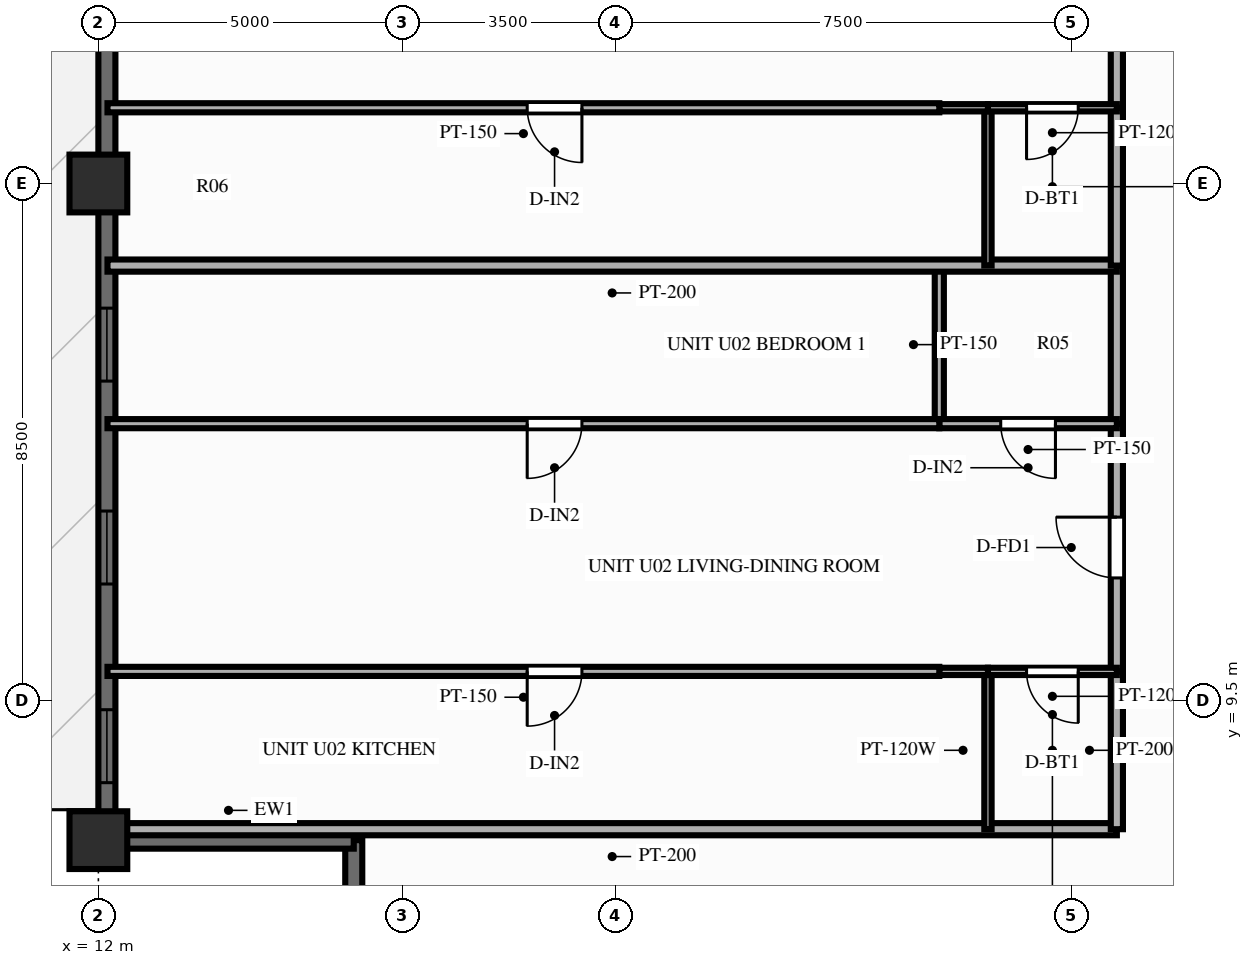
"""IFC4 building model, lengths in metres.
Left out: names, types, materials, properties, quantities, classifications, styles, units other than length and angle.
Written with IfcOpenShell. Run it as: python <this file> out.ifc"""

import sys

from ifc_helpers import new_model, si_unit, direction, frame, frame_2d, origin, origin_2d, place, context, subcontext, project, spatial, rectangle, extrude, source, transform, mapped, element, fill, save


model = new_model("IFC4")
c1 = context("Model", 3, precision=1e-05, world=origin(), true_north=direction((0.0, 1.0)))
c2 = subcontext(c1, "Body", "Model", "MODEL_VIEW")
j1 = project(units=[si_unit("LENGTHUNIT", "METRE"), si_unit("PLANEANGLEUNIT", "RADIAN")], contexts=[c1])
p1 = place(None, origin())
s1 = spatial("IfcSite", under=j1, at=p1, CompositionType="ELEMENT")
p2 = place(p1, origin())
s2 = spatial("IfcBuilding", under=s1, at=p2, CompositionType="ELEMENT")
p3 = place(p2, frame((0.0, 0.0, 141.75)))
s3 = spatial("IfcBuildingStorey", under=s2, at=p3, CompositionType="ELEMENT", Elevation=141.75)
m1 = source(origin(), c2, "Body", "SweptSolid", [
    extrude(rectangle(XDim=0.95, YDim=0.95, at=origin_2d()), origin(), (0.0, 0.0, 1.0), 3.0),
])
for number, where, z_axis, x_axis in (
    (1, (12.0, 18.0, 0.0), (0.0, 0.0, 1.0), (1.0, 0.0, 0.0)),
    (2, (12.0, 7.2, 0.0), (0.0, 0.0, 1.0), (1.0, 0.0, 0.0)),
):
    element("IfcColumn", number, at=place(p3, frame(where, z_axis=z_axis, x_axis=x_axis)), inside=s3, PredefinedType="COLUMN", context=c2, shape_type="MappedRepresentation", body=[
        mapped(m1, transform((0.0, 0.0, 0.0), scale=1.0)),
    ])
p4 = place(p3, frame((12.14, 7.2, 0.0), z_axis=(0.0, 0.0, 1.0), x_axis=(0.0, 1.0, 0.0)))
e3 = element("IfcWall", 3, at=p4, inside=s3, PredefinedType="SOLIDWALL", context=c2, shape_type="SweptSolid", body=[
    extrude(rectangle(XDim=39.6, YDim=0.28, at=frame_2d((19.8, 0.0))), origin(), (0.0, 0.0, 1.0), 2.28),
])
p5 = place(p4, frame((0.945, 0.0, 0.25)))
e4 = element("IfcOpeningElement", 4, at=p5, cuts=e3, PredefinedType="OPENING", context=c2, shape_type="SweptSolid", body=[
    extrude(rectangle(XDim=1.2, YDim=1.5, at=frame_2d((0.6, 0.75))), frame((0.0, 0.152, 0.0), z_axis=(0.0, -1.0, 0.0), x_axis=(1.0, 0.0, 0.0)), (0.0, 0.0, 1.0), 0.304),
])
p6 = place(p4, frame((4.213, 0.0, 0.25)))
e5 = element("IfcOpeningElement", 5, at=p6, cuts=e3, PredefinedType="OPENING", context=c2, shape_type="SweptSolid", body=[
    extrude(rectangle(XDim=1.2, YDim=1.5, at=frame_2d((0.6, 0.75))), frame((0.0, 0.152, 0.0), z_axis=(0.0, -1.0, 0.0), x_axis=(1.0, 0.0, 0.0)), (0.0, 0.0, 1.0), 0.304),
])
p7 = place(p4, frame((7.55, 0.0, 0.25)))
e6 = element("IfcOpeningElement", 6, at=p7, cuts=e3, PredefinedType="OPENING", context=c2, shape_type="SweptSolid", body=[
    extrude(rectangle(XDim=1.2, YDim=1.5, at=frame_2d((0.6, 0.75))), frame((0.0, 0.152, 0.0), z_axis=(0.0, -1.0, 0.0), x_axis=(1.0, 0.0, 0.0)), (0.0, 0.0, 1.0), 0.304),
])
p8 = place(p4, frame((13.483, 0.0, 0.25)))
e7 = element("IfcOpeningElement", 7, at=p8, cuts=e3, PredefinedType="OPENING", context=c2, shape_type="SweptSolid", body=[
    extrude(rectangle(XDim=1.2, YDim=1.5, at=frame_2d((0.6, 0.75))), frame((0.0, 0.152, 0.0), z_axis=(0.0, -1.0, 0.0), x_axis=(1.0, 0.0, 0.0)), (0.0, 0.0, 1.0), 0.304),
])
p9 = place(p4, frame((16.82, 0.0, 0.25)))
e8 = element("IfcOpeningElement", 8, at=p9, cuts=e3, PredefinedType="OPENING", context=c2, shape_type="SweptSolid", body=[
    extrude(rectangle(XDim=1.2, YDim=1.5, at=frame_2d((0.6, 0.75))), frame((0.0, 0.152, 0.0), z_axis=(0.0, -1.0, 0.0), x_axis=(1.0, 0.0, 0.0)), (0.0, 0.0, 1.0), 0.304),
])
p10 = place(p4, frame((19.2, 0.0, 0.25)))
e9 = element("IfcOpeningElement", 9, at=p10, cuts=e3, PredefinedType="OPENING", context=c2, shape_type="SweptSolid", body=[
    extrude(rectangle(XDim=1.2, YDim=1.5, at=frame_2d((0.6, 0.75))), frame((0.0, 0.152, 0.0), z_axis=(0.0, -1.0, 0.0), x_axis=(1.0, 0.0, 0.0)), (0.0, 0.0, 1.0), 0.304),
])
p11 = place(p4, frame((21.578, 0.0, 0.25)))
e10 = element("IfcOpeningElement", 10, at=p11, cuts=e3, PredefinedType="OPENING", context=c2, shape_type="SweptSolid", body=[
    extrude(rectangle(XDim=1.2, YDim=1.5, at=frame_2d((0.6, 0.75))), frame((0.0, 0.152, 0.0), z_axis=(0.0, -1.0, 0.0), x_axis=(1.0, 0.0, 0.0)), (0.0, 0.0, 1.0), 0.304),
])
p12 = place(p4, frame((24.713, 0.0, 0.0)))
e11 = element("IfcOpeningElement", 11, at=p12, cuts=e3, PredefinedType="OPENING", context=c2, shape_type="SweptSolid", body=[
    extrude(rectangle(XDim=1.6, YDim=2.15, at=frame_2d((0.8, 1.075))), frame((0.0, 0.152, 0.0), z_axis=(0.0, -1.0, 0.0), x_axis=(1.0, 0.0, 0.0)), (0.0, 0.0, 1.0), 0.304),
])
p13 = place(p4, frame((29.305, 0.0, 0.25)))
e12 = element("IfcOpeningElement", 12, at=p13, cuts=e3, PredefinedType="OPENING", context=c2, shape_type="SweptSolid", body=[
    extrude(rectangle(XDim=0.7, YDim=1.5, at=frame_2d((0.35, 0.75))), frame((0.0, 0.152, 0.0), z_axis=(0.0, -1.0, 0.0), x_axis=(1.0, 0.0, 0.0)), (0.0, 0.0, 1.0), 0.304),
])
p14 = place(p4, frame((30.848, 0.0, 0.25)))
e13 = element("IfcOpeningElement", 13, at=p14, cuts=e3, PredefinedType="OPENING", context=c2, shape_type="SweptSolid", body=[
    extrude(rectangle(XDim=1.2, YDim=1.5, at=frame_2d((0.6, 0.75))), frame((0.0, 0.152, 0.0), z_axis=(0.0, -1.0, 0.0), x_axis=(1.0, 0.0, 0.0)), (0.0, 0.0, 1.0), 0.304),
])
p15 = place(p4, frame((34.183, 0.0, 0.25)))
e14 = element("IfcOpeningElement", 14, at=p15, cuts=e3, PredefinedType="OPENING", context=c2, shape_type="SweptSolid", body=[
    extrude(rectangle(XDim=1.2, YDim=1.5, at=frame_2d((0.6, 0.75))), frame((0.0, 0.152, 0.0), z_axis=(0.0, -1.0, 0.0), x_axis=(1.0, 0.0, 0.0)), (0.0, 0.0, 1.0), 0.304),
])
p16 = place(p4, frame((37.452, 0.0, 0.25)))
e15 = element("IfcOpeningElement", 15, at=p16, cuts=e3, PredefinedType="OPENING", context=c2, shape_type="SweptSolid", body=[
    extrude(rectangle(XDim=1.2, YDim=1.5, at=frame_2d((0.6, 0.75))), frame((0.0, 0.152, 0.0), z_axis=(0.0, -1.0, 0.0), x_axis=(1.0, 0.0, 0.0)), (0.0, 0.0, 1.0), 0.304),
])
for number, where, z_axis, x_axis in (
    (16, (16.2, 3.08, 0.0), (0.0, 0.0, 1.0), (0.0, 1.0, 0.0)),
    (17, (12.08, 7.2, 0.0), (0.0, 0.0, 1.0), (1.0, 0.0, 0.0)),
):
    element("IfcWall", number, at=place(p3, frame(where, z_axis=z_axis, x_axis=x_axis)), inside=s3, PredefinedType="SOLIDWALL", context=c2, shape_type="SweptSolid", body=[
        extrude(rectangle(XDim=4.12, YDim=0.28, at=frame_2d((2.06, 0.0))), origin(), (0.0, 0.0, 1.0), 2.28),
    ])
p17 = place(p3, frame((28.75, 7.38, 0.0), z_axis=(0.0, 0.0, 1.0), x_axis=(-1.0, 0.0, 0.0)))
e18 = element("IfcWall", 18, at=p17, inside=s3, PredefinedType="PARTITIONING", context=c2, shape_type="SweptSolid", body=[
    extrude(rectangle(XDim=16.6, YDim=0.2, at=frame_2d((8.3, 0.0))), origin(), (0.0, 0.0, 1.0), 2.7),
])
p18 = place(p3, frame((28.75, 7.38, 0.0), z_axis=(0.0, 0.0, 1.0), x_axis=(0.0, 1.0, 0.0)))
e19 = element("IfcWall", 19, at=p18, inside=s3, PredefinedType="PARTITIONING", context=c2, shape_type="SweptSolid", body=[
    extrude(rectangle(XDim=2.596, YDim=0.2, at=frame_2d((1.298, 0.0))), origin(), (0.0, 0.0, 1.0), 2.7),
])
p19 = place(p3, frame((28.75, 9.976, 0.0), z_axis=(0.0, 0.0, 1.0), x_axis=(0.0, 1.0, 0.0)))
e20 = element("IfcWall", 20, at=p19, inside=s3, PredefinedType="PARTITIONING", context=c2, shape_type="SweptSolid", body=[
    extrude(rectangle(XDim=4.074, YDim=0.2, at=frame_2d((2.037, 0.0))), origin(), (0.0, 0.0, 1.0), 2.7),
])
p20 = place(p19, frame((1.537, 0.0, 0.0)))
e21 = element("IfcOpeningElement", 21, at=p20, cuts=e20, PredefinedType="OPENING", context=c2, shape_type="SweptSolid", body=[
    extrude(rectangle(XDim=1.0, YDim=2.15, at=frame_2d((0.5, 1.075))), frame((0.0, 0.112, 0.0), z_axis=(0.0, -1.0, 0.0), x_axis=(1.0, 0.0, 0.0)), (0.0, 0.0, 1.0), 0.224),
])
p21 = place(p3, frame((28.75, 14.05, 0.0), z_axis=(0.0, 0.0, 1.0), x_axis=(0.0, 1.0, 0.0)))
e22 = element("IfcWall", 22, at=p21, inside=s3, PredefinedType="PARTITIONING", context=c2, shape_type="SweptSolid", body=[
    extrude(rectangle(XDim=2.6, YDim=0.2, at=frame_2d((1.3, 0.0))), origin(), (0.0, 0.0, 1.0), 2.7),
])
p22 = place(p3, frame((26.63, 7.38, 0.0), z_axis=(0.0, 0.0, 1.0), x_axis=(0.0, 1.0, 0.0)))
e23 = element("IfcWall", 23, at=p22, inside=s3, PredefinedType="PARTITIONING", context=c2, shape_type="SweptSolid", body=[
    extrude(rectangle(XDim=2.596, YDim=0.12, at=frame_2d((1.298, 0.0))), origin(), (0.0, 0.0, 1.0), 2.7),
])
p23 = place(p3, frame((25.83, 14.05, 0.0), z_axis=(0.0, 0.0, 1.0), x_axis=(0.0, 1.0, 0.0)))
e24 = element("IfcWall", 24, at=p23, inside=s3, PredefinedType="PARTITIONING", context=c2, shape_type="SweptSolid", body=[
    extrude(rectangle(XDim=2.6, YDim=0.15, at=frame_2d((1.3, 0.0))), origin(), (0.0, 0.0, 1.0), 2.7),
])
p24 = place(p3, frame((28.75, 9.976, 0.0), z_axis=(0.0, 0.0, 1.0), x_axis=(-1.0, 0.0, 0.0)))
e25 = element("IfcWall", 25, at=p24, inside=s3, PredefinedType="PARTITIONING", context=c2, shape_type="SweptSolid", body=[
    extrude(rectangle(XDim=2.12, YDim=0.12, at=frame_2d((1.06, 0.0))), origin(), (0.0, 0.0, 1.0), 2.7),
])
p25 = place(p24, frame((0.635, 0.0, 0.0)))
e26 = element("IfcOpeningElement", 26, at=p25, cuts=e25, PredefinedType="OPENING", context=c2, shape_type="SweptSolid", body=[
    extrude(rectangle(XDim=0.85, YDim=2.05, at=frame_2d((0.425, 1.025))), frame((0.0, 0.072, 0.0), z_axis=(0.0, -1.0, 0.0), x_axis=(1.0, 0.0, 0.0)), (0.0, 0.0, 1.0), 0.144),
])
p26 = place(p3, frame((26.63, 9.976, 0.0), z_axis=(0.0, 0.0, 1.0), x_axis=(-1.0, 0.0, 0.0)))
e27 = element("IfcWall", 27, at=p26, inside=s3, PredefinedType="PARTITIONING", context=c2, shape_type="SweptSolid", body=[
    extrude(rectangle(XDim=0.8, YDim=0.12, at=frame_2d((0.4, 0.0))), origin(), (0.0, 0.0, 1.0), 2.7),
])
p27 = place(p3, frame((25.83, 9.976, 0.0), z_axis=(0.0, 0.0, 1.0), x_axis=(-1.0, 0.0, 0.0)))
e28 = element("IfcWall", 28, at=p27, inside=s3, PredefinedType="PARTITIONING", context=c2, shape_type="SweptSolid", body=[
    extrude(rectangle(XDim=13.68, YDim=0.15, at=frame_2d((6.84, 0.0))), origin(), (0.0, 0.0, 1.0), 2.7),
])
p28 = place(p27, frame((5.877, 0.0, 0.0)))
e29 = element("IfcOpeningElement", 29, at=p28, cuts=e28, PredefinedType="OPENING", context=c2, shape_type="SweptSolid", body=[
    extrude(rectangle(XDim=0.9, YDim=2.1, at=frame_2d((0.45, 1.05))), frame((0.0, 0.087, 0.0), z_axis=(0.0, -1.0, 0.0), x_axis=(1.0, 0.0, 0.0)), (0.0, 0.0, 1.0), 0.174),
])
p29 = place(p3, frame((28.75, 14.05, 0.0), z_axis=(0.0, 0.0, 1.0), x_axis=(-1.0, 0.0, 0.0)))
e30 = element("IfcWall", 30, at=p29, inside=s3, PredefinedType="PARTITIONING", context=c2, shape_type="SweptSolid", body=[
    extrude(rectangle(XDim=2.92, YDim=0.15, at=frame_2d((1.46, 0.0))), origin(), (0.0, 0.0, 1.0), 2.7),
])
p30 = place(p29, frame((1.01, 0.0, 0.0)))
e31 = element("IfcOpeningElement", 31, at=p30, cuts=e30, PredefinedType="OPENING", context=c2, shape_type="SweptSolid", body=[
    extrude(rectangle(XDim=0.9, YDim=2.1, at=frame_2d((0.45, 1.05))), frame((0.0, 0.087, 0.0), z_axis=(0.0, -1.0, 0.0), x_axis=(1.0, 0.0, 0.0)), (0.0, 0.0, 1.0), 0.174),
])
p31 = place(p3, frame((25.83, 14.05, 0.0), z_axis=(0.0, 0.0, 1.0), x_axis=(-1.0, 0.0, 0.0)))
e32 = element("IfcWall", 32, at=p31, inside=s3, PredefinedType="PARTITIONING", context=c2, shape_type="SweptSolid", body=[
    extrude(rectangle(XDim=13.68, YDim=0.15, at=frame_2d((6.84, 0.0))), origin(), (0.0, 0.0, 1.0), 2.7),
])
p32 = place(p31, frame((5.877, 0.0, 0.0)))
e33 = element("IfcOpeningElement", 33, at=p32, cuts=e32, PredefinedType="OPENING", context=c2, shape_type="SweptSolid", body=[
    extrude(rectangle(XDim=0.9, YDim=2.1, at=frame_2d((0.45, 1.05))), frame((0.0, 0.087, 0.0), z_axis=(0.0, -1.0, 0.0), x_axis=(1.0, 0.0, 0.0)), (0.0, 0.0, 1.0), 0.174),
])
p33 = place(p3, frame((28.75, 16.65, 0.0), z_axis=(0.0, 0.0, 1.0), x_axis=(-1.0, 0.0, 0.0)))
e34 = element("IfcWall", 34, at=p33, inside=s3, PredefinedType="PARTITIONING", context=c2, shape_type="SweptSolid", body=[
    extrude(rectangle(XDim=16.6, YDim=0.2, at=frame_2d((8.3, 0.0))), origin(), (0.0, 0.0, 1.0), 2.7),
])
p34 = place(p3, frame((28.75, 16.65, 0.0), z_axis=(0.0, 0.0, 1.0), x_axis=(0.0, 1.0, 0.0)))
e35 = element("IfcWall", 35, at=p34, inside=s3, PredefinedType="PARTITIONING", context=c2, shape_type="SweptSolid", body=[
    extrude(rectangle(XDim=2.596, YDim=0.2, at=frame_2d((1.298, 0.0))), origin(), (0.0, 0.0, 1.0), 2.7),
])
p35 = place(p3, frame((28.75, 19.246, 0.0), z_axis=(0.0, 0.0, 1.0), x_axis=(0.0, 1.0, 0.0)))
e36 = element("IfcWall", 36, at=p35, inside=s3, PredefinedType="PARTITIONING", context=c2, shape_type="SweptSolid", body=[
    extrude(rectangle(XDim=4.074, YDim=0.2, at=frame_2d((2.037, 0.0))), origin(), (0.0, 0.0, 1.0), 2.7),
])
p36 = place(p35, frame((1.537, 0.0, 0.0)))
e37 = element("IfcOpeningElement", 37, at=p36, cuts=e36, PredefinedType="OPENING", context=c2, shape_type="SweptSolid", body=[
    extrude(rectangle(XDim=1.0, YDim=2.15, at=frame_2d((0.5, 1.075))), frame((0.0, 0.112, 0.0), z_axis=(0.0, -1.0, 0.0), x_axis=(1.0, 0.0, 0.0)), (0.0, 0.0, 1.0), 0.224),
])
p37 = place(p3, frame((26.63, 16.65, 0.0), z_axis=(0.0, 0.0, 1.0), x_axis=(0.0, 1.0, 0.0)))
e38 = element("IfcWall", 38, at=p37, inside=s3, PredefinedType="PARTITIONING", context=c2, shape_type="SweptSolid", body=[
    extrude(rectangle(XDim=2.596, YDim=0.12, at=frame_2d((1.298, 0.0))), origin(), (0.0, 0.0, 1.0), 2.7),
])
p38 = place(p3, frame((28.75, 19.246, 0.0), z_axis=(0.0, 0.0, 1.0), x_axis=(-1.0, 0.0, 0.0)))
e39 = element("IfcWall", 39, at=p38, inside=s3, PredefinedType="PARTITIONING", context=c2, shape_type="SweptSolid", body=[
    extrude(rectangle(XDim=2.12, YDim=0.12, at=frame_2d((1.06, 0.0))), origin(), (0.0, 0.0, 1.0), 2.7),
])
p39 = place(p38, frame((0.635, 0.0, 0.0)))
e40 = element("IfcOpeningElement", 40, at=p39, cuts=e39, PredefinedType="OPENING", context=c2, shape_type="SweptSolid", body=[
    extrude(rectangle(XDim=0.85, YDim=2.05, at=frame_2d((0.425, 1.025))), frame((0.0, 0.072, 0.0), z_axis=(0.0, -1.0, 0.0), x_axis=(1.0, 0.0, 0.0)), (0.0, 0.0, 1.0), 0.144),
])
p40 = place(p3, frame((26.63, 19.246, 0.0), z_axis=(0.0, 0.0, 1.0), x_axis=(-1.0, 0.0, 0.0)))
e41 = element("IfcWall", 41, at=p40, inside=s3, PredefinedType="PARTITIONING", context=c2, shape_type="SweptSolid", body=[
    extrude(rectangle(XDim=0.8, YDim=0.12, at=frame_2d((0.4, 0.0))), origin(), (0.0, 0.0, 1.0), 2.7),
])
p41 = place(p3, frame((25.83, 19.246, 0.0), z_axis=(0.0, 0.0, 1.0), x_axis=(-1.0, 0.0, 0.0)))
e42 = element("IfcWall", 42, at=p41, inside=s3, PredefinedType="PARTITIONING", context=c2, shape_type="SweptSolid", body=[
    extrude(rectangle(XDim=13.68, YDim=0.15, at=frame_2d((6.84, 0.0))), origin(), (0.0, 0.0, 1.0), 2.7),
])
p42 = place(p41, frame((5.877, 0.0, 0.0)))
e43 = element("IfcOpeningElement", 43, at=p42, cuts=e42, PredefinedType="OPENING", context=c2, shape_type="SweptSolid", body=[
    extrude(rectangle(XDim=0.9, YDim=2.1, at=frame_2d((0.45, 1.05))), frame((0.0, 0.087, 0.0), z_axis=(0.0, -1.0, 0.0), x_axis=(1.0, 0.0, 0.0)), (0.0, 0.0, 1.0), 0.174),
])
m2 = source(origin(), c2, "Body", "SweptSolid", [
    extrude(rectangle(XDim=1.2, YDim=1.5, at=frame_2d((0.6, 0.75))), frame((0.0, 0.03, 0.0), z_axis=(0.0, -1.0, 0.0), x_axis=(1.0, 0.0, 0.0)), (0.0, 0.0, 1.0), 0.06),
])
p43 = place(p5, origin())
e44 = element("IfcWindow", 44, at=p43, inside=s3, PartitioningType="SINGLE_PANEL", PredefinedType="WINDOW", context=c2, shape_type="MappedRepresentation", body=[
    mapped(m2, transform((0.0, 0.0, 0.0), scale=1.0)),
])
fill(e4, e44)
p44 = place(p6, origin())
e45 = element("IfcWindow", 45, at=p44, inside=s3, PartitioningType="SINGLE_PANEL", PredefinedType="WINDOW", context=c2, shape_type="MappedRepresentation", body=[
    mapped(m2, transform((0.0, 0.0, 0.0), scale=1.0)),
])
fill(e5, e45)
p45 = place(p7, origin())
e46 = element("IfcWindow", 46, at=p45, inside=s3, PartitioningType="SINGLE_PANEL", PredefinedType="WINDOW", context=c2, shape_type="MappedRepresentation", body=[
    mapped(m2, transform((0.0, 0.0, 0.0), scale=1.0)),
])
fill(e6, e46)
m3 = source(origin(), c2, "Body", "SweptSolid", [
    extrude(rectangle(XDim=1.0, YDim=2.15, at=frame_2d((0.5, 1.075))), frame((0.0, 0.025, 0.0), z_axis=(0.0, -1.0, 0.0), x_axis=(1.0, 0.0, 0.0)), (0.0, 0.0, 1.0), 0.05),
])
p46 = place(p20, origin())
e47 = element("IfcDoor", 47, at=p46, inside=s3, OperationType="SINGLE_SWING_RIGHT", PredefinedType="DOOR", context=c2, shape_type="MappedRepresentation", body=[
    mapped(m3, transform((0.0, 0.0, 0.0), scale=1.0)),
])
fill(e21, e47)
m4 = source(origin(), c2, "Body", "SweptSolid", [
    extrude(rectangle(XDim=0.85, YDim=2.05, at=frame_2d((0.425, 1.025))), frame((0.0, 0.025, 0.0), z_axis=(0.0, -1.0, 0.0), x_axis=(1.0, 0.0, 0.0)), (0.0, 0.0, 1.0), 0.05),
])
p47 = place(p25, origin())
e48 = element("IfcDoor", 48, at=p47, inside=s3, OperationType="SINGLE_SWING_LEFT", PredefinedType="DOOR", context=c2, shape_type="MappedRepresentation", body=[
    mapped(m4, transform((0.0, 0.0, 0.0), scale=1.0)),
])
fill(e26, e48)
m5 = source(origin(), c2, "Body", "SweptSolid", [
    extrude(rectangle(XDim=0.9, YDim=2.1, at=frame_2d((0.45, 1.05))), frame((0.0, 0.025, 0.0), z_axis=(0.0, -1.0, 0.0), x_axis=(1.0, 0.0, 0.0)), (0.0, 0.0, 1.0), 0.05),
])
p48 = place(p28, origin())
e49 = element("IfcDoor", 49, at=p48, inside=s3, OperationType="SINGLE_SWING_RIGHT", PredefinedType="DOOR", context=c2, shape_type="MappedRepresentation", body=[
    mapped(m5, transform((0.0, 0.0, 0.0), scale=1.0)),
])
fill(e29, e49)
p49 = place(p30, origin())
e50 = element("IfcDoor", 50, at=p49, inside=s3, OperationType="SINGLE_SWING_LEFT", PredefinedType="DOOR", context=c2, shape_type="MappedRepresentation", body=[
    mapped(m5, transform((0.0, 0.0, 0.0), scale=1.0)),
])
fill(e31, e50)
p50 = place(p32, origin())
e51 = element("IfcDoor", 51, at=p50, inside=s3, OperationType="SINGLE_SWING_RIGHT", PredefinedType="DOOR", context=c2, shape_type="MappedRepresentation", body=[
    mapped(m5, transform((0.0, 0.0, 0.0), scale=1.0)),
])
fill(e33, e51)
p51 = place(p39, origin())
e52 = element("IfcDoor", 52, at=p51, inside=s3, OperationType="SINGLE_SWING_RIGHT", PredefinedType="DOOR", context=c2, shape_type="MappedRepresentation", body=[
    mapped(m4, transform((0.0, 0.0, 0.0), scale=1.0)),
])
fill(e40, e52)
p52 = place(p42, origin())
e53 = element("IfcDoor", 53, at=p52, inside=s3, OperationType="SINGLE_SWING_LEFT", PredefinedType="DOOR", context=c2, shape_type="MappedRepresentation", body=[
    mapped(m5, transform((0.0, 0.0, 0.0), scale=1.0)),
])
fill(e43, e53)
save(model, sys.argv[1])
